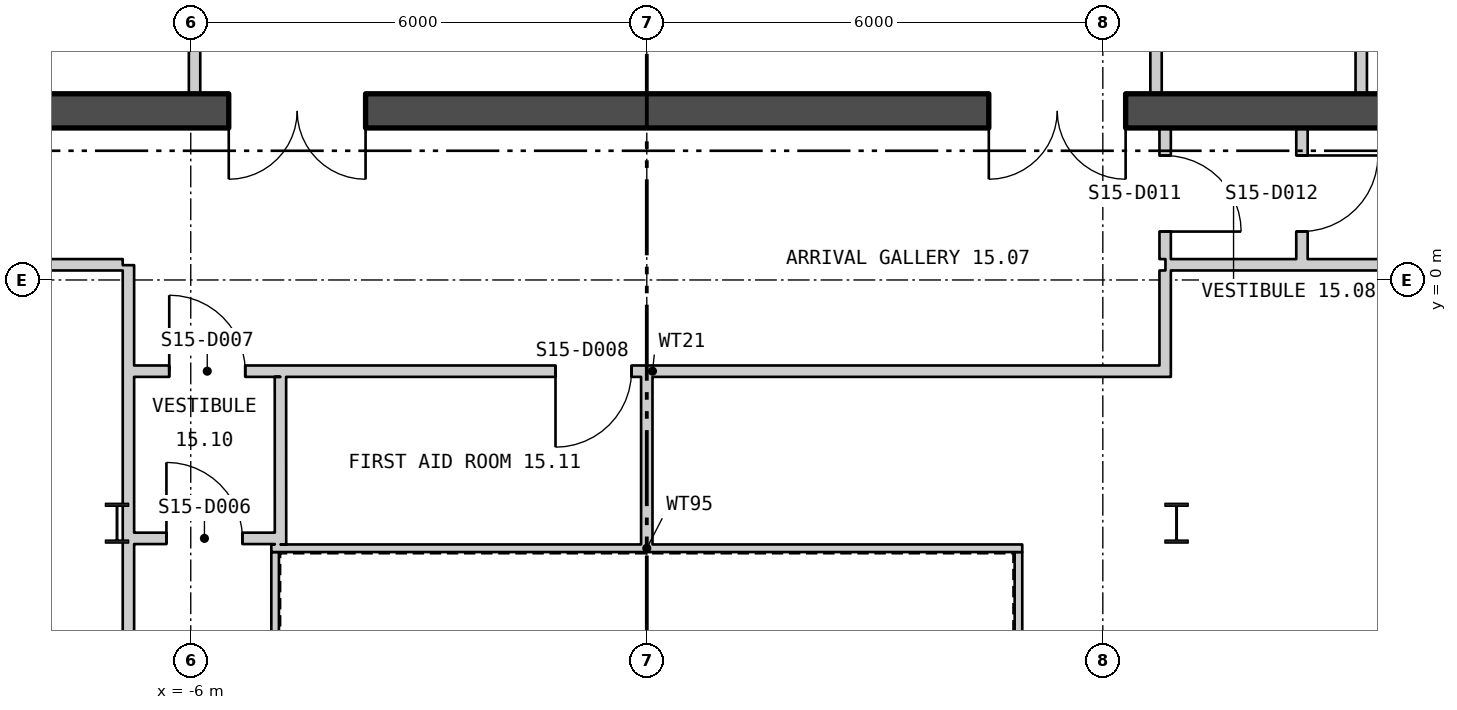
"""IFC4 building model, lengths in metres.
Left out: names, types, materials, properties, quantities, classifications, styles, units other than length and angle.
Written with IfcOpenShell. Run it as: python <this file> out.ifc"""

import sys

from ifc_helpers import new_model, si_unit, direction, frame, frame_2d, origin, origin_2d, place, context, subcontext, project, spatial, polyline, rectangle, i_section, outline, extrude, element, fill, save


model = new_model("IFC4")
c1 = context("Model", 3, precision=1e-05, world=origin(), true_north=direction((0.0, 1.0)))
c2 = subcontext(c1, "Body", "Model", "MODEL_VIEW")
j1 = project(units=[si_unit("LENGTHUNIT", "METRE"), si_unit("PLANEANGLEUNIT", "RADIAN")], contexts=[c1])
p1 = place(None, origin())
s1 = spatial("IfcSite", under=j1, at=p1, CompositionType="ELEMENT")
p2 = place(p1, origin())
s2 = spatial("IfcBuilding", under=s1, at=p2, CompositionType="ELEMENT")
p3 = place(p2, frame((0.0, 0.0, 204.3)))
s3 = spatial("IfcBuildingStorey", under=s2, at=p3, CompositionType="ELEMENT", Elevation=204.3)
for number, where, z_axis, x_axis in (
    (1, (6.97, -3.2, 0.0), (0.0, 0.0, 1.0), (1.0, 0.0, 0.0)),
    (2, (-6.97, -3.2, 0.0), (0.0, 0.0, 1.0), (1.0, 0.0, 0.0)),
):
    element("IfcColumn", number, at=place(p3, frame(where, z_axis=z_axis, x_axis=x_axis)), inside=s3, PredefinedType="COLUMN", context=c2, shape_type="SweptSolid", body=[
        extrude(i_section(OverallWidth=0.306, OverallDepth=0.524, WebThickness=0.021, FlangeThickness=0.04, at=origin_2d()), origin(), (0.0, 0.0, 1.0), 3.9),
    ])
p4 = place(p3, frame((-26.385, 13.887, -0.18), z_axis=(0.0, 0.0, 1.0), x_axis=(0.499999764979, -0.866025539474, 0.0)))
e3 = element("IfcWall", 3, at=p4, inside=s3, PredefinedType="SOLIDWALL", context=c2, shape_type="SweptSolid", body=[
    extrude(outline(polyline([(-0.13, -0.225), (45.87, -0.225), (45.61, 0.225), (0.13, 0.225), (-0.13, -0.225)])), origin(), (0.0, 0.0, 1.0), 3.68),
])
p5 = place(p4, frame((1.424, 0.0, 1.08)))
e4 = element("IfcOpeningElement", 4, at=p5, cuts=e3, PredefinedType="OPENING", context=c2, shape_type="SweptSolid", body=[
    extrude(rectangle(XDim=2.4, YDim=2.0, at=frame_2d((1.2, 1.0))), frame((0.0, 0.235, 0.0), z_axis=(0.0, -1.0, 0.0), x_axis=(1.0, 0.0, 0.0)), (0.0, 0.0, 1.0), 0.47),
])
p6 = place(p4, frame((5.893, 0.0, 1.08)))
e5 = element("IfcOpeningElement", 5, at=p6, cuts=e3, PredefinedType="OPENING", context=c2, shape_type="SweptSolid", body=[
    extrude(rectangle(XDim=2.4, YDim=2.0, at=frame_2d((1.2, 1.0))), frame((0.0, 0.235, 0.0), z_axis=(0.0, -1.0, 0.0), x_axis=(1.0, 0.0, 0.0)), (0.0, 0.0, 1.0), 0.47),
])
p7 = place(p4, frame((10.401, 0.0, 1.08)))
e6 = element("IfcOpeningElement", 6, at=p7, cuts=e3, PredefinedType="OPENING", context=c2, shape_type="SweptSolid", body=[
    extrude(rectangle(XDim=2.4, YDim=2.0, at=frame_2d((1.2, 1.0))), frame((0.0, 0.235, 0.0), z_axis=(0.0, -1.0, 0.0), x_axis=(1.0, 0.0, 0.0)), (0.0, 0.0, 1.0), 0.47),
])
p8 = place(p4, frame((14.909, 0.0, 1.08)))
e7 = element("IfcOpeningElement", 7, at=p8, cuts=e3, PredefinedType="OPENING", context=c2, shape_type="SweptSolid", body=[
    extrude(rectangle(XDim=2.4, YDim=2.0, at=frame_2d((1.2, 1.0))), frame((0.0, 0.235, 0.0), z_axis=(0.0, -1.0, 0.0), x_axis=(1.0, 0.0, 0.0)), (0.0, 0.0, 1.0), 0.47),
])
p9 = place(p4, frame((19.416, 0.0, 1.08)))
e8 = element("IfcOpeningElement", 8, at=p9, cuts=e3, PredefinedType="OPENING", context=c2, shape_type="SweptSolid", body=[
    extrude(rectangle(XDim=2.4, YDim=2.0, at=frame_2d((1.2, 1.0))), frame((0.0, 0.235, 0.0), z_axis=(0.0, -1.0, 0.0), x_axis=(1.0, 0.0, 0.0)), (0.0, 0.0, 1.0), 0.47),
])
p10 = place(p4, frame((23.924, 0.0, 1.08)))
e9 = element("IfcOpeningElement", 9, at=p10, cuts=e3, PredefinedType="OPENING", context=c2, shape_type="SweptSolid", body=[
    extrude(rectangle(XDim=2.4, YDim=2.0, at=frame_2d((1.2, 1.0))), frame((0.0, 0.235, 0.0), z_axis=(0.0, -1.0, 0.0), x_axis=(1.0, 0.0, 0.0)), (0.0, 0.0, 1.0), 0.47),
])
p11 = place(p4, frame((28.431, 0.0, 1.08)))
e10 = element("IfcOpeningElement", 10, at=p11, cuts=e3, PredefinedType="OPENING", context=c2, shape_type="SweptSolid", body=[
    extrude(rectangle(XDim=2.4, YDim=2.0, at=frame_2d((1.2, 1.0))), frame((0.0, 0.235, 0.0), z_axis=(0.0, -1.0, 0.0), x_axis=(1.0, 0.0, 0.0)), (0.0, 0.0, 1.0), 0.47),
])
p12 = place(p4, frame((32.939, 0.0, 1.08)))
e11 = element("IfcOpeningElement", 11, at=p12, cuts=e3, PredefinedType="OPENING", context=c2, shape_type="SweptSolid", body=[
    extrude(rectangle(XDim=2.4, YDim=2.0, at=frame_2d((1.2, 1.0))), frame((0.0, 0.235, 0.0), z_axis=(0.0, -1.0, 0.0), x_axis=(1.0, 0.0, 0.0)), (0.0, 0.0, 1.0), 0.47),
])
p13 = place(p4, frame((41.916, 0.0, 1.08)))
e12 = element("IfcOpeningElement", 12, at=p13, cuts=e3, PredefinedType="OPENING", context=c2, shape_type="SweptSolid", body=[
    extrude(rectangle(XDim=2.4, YDim=2.0, at=frame_2d((1.2, 1.0))), frame((0.0, 0.235, 0.0), z_axis=(0.0, -1.0, 0.0), x_axis=(1.0, 0.0, 0.0)), (0.0, 0.0, 1.0), 0.47),
])
p14 = place(p3, frame((3.515, -25.726, -0.18), z_axis=(0.0, 0.0, 1.0), x_axis=(0.499999764979, 0.866025539474, 0.0)))
e13 = element("IfcWall", 13, at=p14, inside=s3, PredefinedType="SOLIDWALL", context=c2, shape_type="SweptSolid", body=[
    extrude(outline(polyline([(-0.13, -0.225), (45.87, -0.225), (45.61, 0.225), (0.13, 0.225), (-0.13, -0.225)])), origin(), (0.0, 0.0, 1.0), 3.68),
])
p15 = place(p14, frame((1.424, 0.0, 1.08)))
e14 = element("IfcOpeningElement", 14, at=p15, cuts=e13, PredefinedType="OPENING", context=c2, shape_type="SweptSolid", body=[
    extrude(rectangle(XDim=2.4, YDim=2.0, at=frame_2d((1.2, 1.0))), frame((0.0, 0.235, 0.0), z_axis=(0.0, -1.0, 0.0), x_axis=(1.0, 0.0, 0.0)), (0.0, 0.0, 1.0), 0.47),
])
p16 = place(p14, frame((5.893, 0.0, 1.08)))
e15 = element("IfcOpeningElement", 15, at=p16, cuts=e13, PredefinedType="OPENING", context=c2, shape_type="SweptSolid", body=[
    extrude(rectangle(XDim=2.4, YDim=2.0, at=frame_2d((1.2, 1.0))), frame((0.0, 0.235, 0.0), z_axis=(0.0, -1.0, 0.0), x_axis=(1.0, 0.0, 0.0)), (0.0, 0.0, 1.0), 0.47),
])
p17 = place(p14, frame((10.401, 0.0, 1.08)))
e16 = element("IfcOpeningElement", 16, at=p17, cuts=e13, PredefinedType="OPENING", context=c2, shape_type="SweptSolid", body=[
    extrude(rectangle(XDim=2.4, YDim=2.0, at=frame_2d((1.2, 1.0))), frame((0.0, 0.235, 0.0), z_axis=(0.0, -1.0, 0.0), x_axis=(1.0, 0.0, 0.0)), (0.0, 0.0, 1.0), 0.47),
])
p18 = place(p14, frame((14.909, 0.0, 1.08)))
e17 = element("IfcOpeningElement", 17, at=p18, cuts=e13, PredefinedType="OPENING", context=c2, shape_type="SweptSolid", body=[
    extrude(rectangle(XDim=2.4, YDim=2.0, at=frame_2d((1.2, 1.0))), frame((0.0, 0.235, 0.0), z_axis=(0.0, -1.0, 0.0), x_axis=(1.0, 0.0, 0.0)), (0.0, 0.0, 1.0), 0.47),
])
p19 = place(p14, frame((19.416, 0.0, 1.08)))
e18 = element("IfcOpeningElement", 18, at=p19, cuts=e13, PredefinedType="OPENING", context=c2, shape_type="SweptSolid", body=[
    extrude(rectangle(XDim=2.4, YDim=2.0, at=frame_2d((1.2, 1.0))), frame((0.0, 0.235, 0.0), z_axis=(0.0, -1.0, 0.0), x_axis=(1.0, 0.0, 0.0)), (0.0, 0.0, 1.0), 0.47),
])
p20 = place(p14, frame((23.924, 0.0, 1.08)))
e19 = element("IfcOpeningElement", 19, at=p20, cuts=e13, PredefinedType="OPENING", context=c2, shape_type="SweptSolid", body=[
    extrude(rectangle(XDim=2.4, YDim=2.0, at=frame_2d((1.2, 1.0))), frame((0.0, 0.235, 0.0), z_axis=(0.0, -1.0, 0.0), x_axis=(1.0, 0.0, 0.0)), (0.0, 0.0, 1.0), 0.47),
])
p21 = place(p14, frame((28.431, 0.0, 1.08)))
e20 = element("IfcOpeningElement", 20, at=p21, cuts=e13, PredefinedType="OPENING", context=c2, shape_type="SweptSolid", body=[
    extrude(rectangle(XDim=2.4, YDim=2.0, at=frame_2d((1.2, 1.0))), frame((0.0, 0.235, 0.0), z_axis=(0.0, -1.0, 0.0), x_axis=(1.0, 0.0, 0.0)), (0.0, 0.0, 1.0), 0.47),
])
p22 = place(p14, frame((32.939, 0.0, 1.08)))
e21 = element("IfcOpeningElement", 21, at=p22, cuts=e13, PredefinedType="OPENING", context=c2, shape_type="SweptSolid", body=[
    extrude(rectangle(XDim=2.4, YDim=2.0, at=frame_2d((1.2, 1.0))), frame((0.0, 0.235, 0.0), z_axis=(0.0, -1.0, 0.0), x_axis=(1.0, 0.0, 0.0)), (0.0, 0.0, 1.0), 0.47),
])
p23 = place(p14, frame((37.447, 0.0, 1.08)))
e22 = element("IfcOpeningElement", 22, at=p23, cuts=e13, PredefinedType="OPENING", context=c2, shape_type="SweptSolid", body=[
    extrude(rectangle(XDim=2.4, YDim=2.0, at=frame_2d((1.2, 1.0))), frame((0.0, 0.235, 0.0), z_axis=(0.0, -1.0, 0.0), x_axis=(1.0, 0.0, 0.0)), (0.0, 0.0, 1.0), 0.47),
])
p24 = place(p14, frame((41.916, 0.0, 1.08)))
e23 = element("IfcOpeningElement", 23, at=p24, cuts=e13, PredefinedType="OPENING", context=c2, shape_type="SweptSolid", body=[
    extrude(rectangle(XDim=2.4, YDim=2.0, at=frame_2d((1.2, 1.0))), frame((0.0, 0.235, 0.0), z_axis=(0.0, -1.0, 0.0), x_axis=(1.0, 0.0, 0.0)), (0.0, 0.0, 1.0), 0.47),
])
p25 = place(p3, frame((4.89, -11.62, 0.0), z_axis=(0.0, 0.0, 1.0), x_axis=(0.0, 1.0, 0.0)))
e24 = element("IfcWall", 24, at=p25, inside=s3, PredefinedType="PARTITIONING", context=c2, shape_type="SweptSolid", body=[
    extrude(rectangle(XDim=8.04, YDim=0.1, at=frame_2d((4.02, 0.0))), origin(), (0.0, 0.0, 1.0), 3.7),
])
p26 = place(p3, frame((4.94, -3.53, 0.0), z_axis=(0.0, 0.0, 1.0), x_axis=(-1.0, 0.0, 0.0)))
e25 = element("IfcWall", 25, at=p26, inside=s3, PredefinedType="PARTITIONING", context=c2, shape_type="SweptSolid", body=[
    extrude(rectangle(XDim=9.88, YDim=0.1, at=frame_2d((4.94, 0.0))), origin(), (0.0, 0.0, 1.0), 3.7),
])
p27 = place(p3, frame((-4.89, -3.58, 0.0), z_axis=(0.0, 0.0, 1.0), x_axis=(0.0, -1.0, 0.0)))
e26 = element("IfcWall", 26, at=p27, inside=s3, PredefinedType="PARTITIONING", context=c2, shape_type="SweptSolid", body=[
    extrude(rectangle(XDim=8.04, YDim=0.1, at=frame_2d((4.02, 0.0))), origin(), (0.0, 0.0, 1.0), 3.7),
])
p28 = place(p3, frame((-16.2, 2.225, 0.0), z_axis=(0.0, 0.0, 1.0), x_axis=(1.0, 0.0, 0.0)))
e27 = element("IfcWall", 27, at=p28, inside=s3, PredefinedType="SHEAR", context=c2, shape_type="SweptSolid", body=[
    extrude(rectangle(XDim=32.4, YDim=0.45, at=frame_2d((16.2, 0.0))), origin(), (0.0, 0.0, 1.0), 3.7),
])
p29 = place(p28, frame((10.7, 0.0, 0.0)))
e28 = element("IfcOpeningElement", 28, at=p29, cuts=e27, PredefinedType="OPENING", context=c2, shape_type="SweptSolid", body=[
    extrude(rectangle(XDim=1.8, YDim=2.4, at=frame_2d((0.9, 1.2))), frame((0.0, 0.235, 0.0), z_axis=(0.0, -1.0, 0.0), x_axis=(1.0, 0.0, 0.0)), (0.0, 0.0, 1.0), 0.47),
])
p30 = place(p28, frame((20.7, 0.0, 0.0)))
e29 = element("IfcOpeningElement", 29, at=p30, cuts=e27, PredefinedType="OPENING", context=c2, shape_type="SweptSolid", body=[
    extrude(rectangle(XDim=1.8, YDim=2.4, at=frame_2d((0.9, 1.2))), frame((0.0, 0.235, 0.0), z_axis=(0.0, -1.0, 0.0), x_axis=(1.0, 0.0, 0.0)), (0.0, 0.0, 1.0), 0.47),
])
p31 = place(p3, frame((-5.95, 2.45, 0.0), z_axis=(0.0, 0.0, 1.0), x_axis=(0.0, 1.0, 0.0)))
e30 = element("IfcWall", 30, at=p31, inside=s3, PredefinedType="PARTITIONING", context=c2, shape_type="SweptSolid", body=[
    extrude(rectangle(XDim=2.975, YDim=0.15, at=frame_2d((1.488, 0.0))), origin(), (0.0, 0.0, 1.0), 3.7),
])
for number, where, z_axis, x_axis in (
    (31, (6.7, 2.45, 0.0), (0.0, 0.0, 1.0), (0.0, 1.0, 0.0)),
    (32, (9.4, 2.45, 0.0), (0.0, 0.0, 1.0), (0.0, 1.0, 0.0)),
):
    element("IfcWall", number, at=place(p3, frame(where, z_axis=z_axis, x_axis=x_axis)), inside=s3, PredefinedType="PARTITIONING", context=c2, shape_type="SweptSolid", body=[
        extrude(rectangle(XDim=3.575, YDim=0.15, at=frame_2d((1.788, 0.0))), origin(), (0.0, 0.0, 1.0), 3.7),
    ])
p32 = place(p3, frame((-17.925, 0.2, 0.0), z_axis=(0.0, 0.0, 1.0), x_axis=(1.0, 0.0, 0.0)))
e33 = element("IfcWall", 33, at=p32, inside=s3, PredefinedType="PARTITIONING", context=c2, shape_type="SweptSolid", body=[
    extrude(rectangle(XDim=11.03, YDim=0.15, at=frame_2d((5.515, 0.0))), origin(), (0.0, 0.0, 1.0), 3.7),
])
p33 = place(p3, frame((-6.82, -13.675, 0.0), z_axis=(0.0, 0.0, 1.0), x_axis=(0.0, 1.0, 0.0)))
e34 = element("IfcWall", 34, at=p33, inside=s3, PredefinedType="PARTITIONING", context=c2, shape_type="SweptSolid", body=[
    extrude(rectangle(XDim=10.263, YDim=0.15, at=frame_2d((5.131, 0.0))), origin(), (0.0, 0.0, 1.0), 3.11),
])
p34 = place(p3, frame((-6.82, -3.412, 0.0), z_axis=(0.0, 0.0, 1.0), x_axis=(0.0, 1.0, 0.0)))
e35 = element("IfcWall", 35, at=p34, inside=s3, PredefinedType="PARTITIONING", context=c2, shape_type="SweptSolid", body=[
    extrude(rectangle(XDim=3.607, YDim=0.15, at=frame_2d((1.804, 0.0))), origin(), (0.0, 0.0, 1.0), 3.7),
])
p35 = place(p3, frame((-6.745, -3.4, 0.0), z_axis=(0.0, 0.0, 1.0), x_axis=(1.0, 0.0, 0.0)))
e36 = element("IfcWall", 36, at=p35, inside=s3, PredefinedType="PARTITIONING", context=c2, shape_type="SweptSolid", body=[
    extrude(rectangle(XDim=1.851, YDim=0.15, at=frame_2d((0.925, 0.0))), origin(), (0.0, 0.0, 1.0), 3.7),
])
p36 = place(p35, frame((0.425, 0.0, 0.0)))
e37 = element("IfcOpeningElement", 37, at=p36, cuts=e36, PredefinedType="OPENING", context=c2, shape_type="SweptSolid", body=[
    extrude(rectangle(XDim=1.0, YDim=2.1, at=frame_2d((0.5, 1.05))), frame((0.0, 0.085, 0.0), z_axis=(0.0, -1.0, 0.0), x_axis=(1.0, 0.0, 0.0)), (0.0, 0.0, 1.0), 0.17),
])
p37 = place(p3, frame((-6.745, -1.2, 0.0), z_axis=(0.0, 0.0, 1.0), x_axis=(1.0, 0.0, 0.0)))
e38 = element("IfcWall", 38, at=p37, inside=s3, PredefinedType="PARTITIONING", context=c2, shape_type="SweptSolid", body=[
    extrude(rectangle(XDim=13.64, YDim=0.15, at=frame_2d((6.82, 0.0))), origin(), (0.0, 0.0, 1.0), 3.7),
])
p38 = place(p37, frame((0.462, 0.0, 0.0)))
e39 = element("IfcOpeningElement", 39, at=p38, cuts=e38, PredefinedType="OPENING", context=c2, shape_type="SweptSolid", body=[
    extrude(rectangle(XDim=1.0, YDim=2.1, at=frame_2d((0.5, 1.05))), frame((0.0, 0.085, 0.0), z_axis=(0.0, -1.0, 0.0), x_axis=(1.0, 0.0, 0.0)), (0.0, 0.0, 1.0), 0.17),
])
p39 = place(p37, frame((5.544, 0.0, 0.0)))
e40 = element("IfcOpeningElement", 40, at=p39, cuts=e38, PredefinedType="OPENING", context=c2, shape_type="SweptSolid", body=[
    extrude(rectangle(XDim=1.0, YDim=2.1, at=frame_2d((0.5, 1.05))), frame((0.0, 0.085, 0.0), z_axis=(0.0, -1.0, 0.0), x_axis=(1.0, 0.0, 0.0)), (0.0, 0.0, 1.0), 0.17),
])
p40 = place(p3, frame((-4.819, -3.48, 0.0), z_axis=(0.0, 0.0, 1.0), x_axis=(-0.000453514693, 0.999999897162, 0.0)))
e41 = element("IfcWall", 41, at=p40, inside=s3, PredefinedType="PARTITIONING", context=c2, shape_type="SweptSolid", body=[
    extrude(rectangle(XDim=2.205, YDim=0.15, at=frame_2d((1.103, 0.0))), origin(), (0.0, 0.0, 1.0), 3.7),
])
p41 = place(p3, frame((0.0, -3.48, 0.0), z_axis=(0.0, 0.0, 1.0), x_axis=(0.0, 1.0, 0.0)))
e42 = element("IfcWall", 42, at=p41, inside=s3, PredefinedType="PARTITIONING", context=c2, shape_type="SweptSolid", body=[
    extrude(rectangle(XDim=0.38, YDim=0.15, at=frame_2d((0.19, 0.0))), origin(), (0.0, 0.0, 1.0), 3.7),
])
p42 = place(p3, frame((0.0, -3.1, 0.0), z_axis=(0.0, 0.0, 1.0), x_axis=(0.0, 1.0, 0.0)))
e43 = element("IfcWall", 43, at=p42, inside=s3, PredefinedType="PARTITIONING", context=c2, shape_type="SweptSolid", body=[
    extrude(rectangle(XDim=1.825, YDim=0.15, at=frame_2d((0.912, 0.0))), origin(), (0.0, 0.0, 1.0), 3.15),
])
p43 = place(p3, frame((6.82, -1.125, 0.0), z_axis=(0.0, 0.0, 1.0), x_axis=(0.0, 1.0, 0.0)))
e44 = element("IfcWall", 44, at=p43, inside=s3, PredefinedType="PARTITIONING", context=c2, shape_type="SweptSolid", body=[
    extrude(rectangle(XDim=1.25, YDim=0.15, at=frame_2d((0.625, 0.0))), origin(), (0.0, 0.0, 1.0), 3.7),
])
p44 = place(p3, frame((6.82, 0.275, 0.0), z_axis=(0.0, 0.0, 1.0), x_axis=(0.0, 1.0, 0.0)))
e45 = element("IfcWall", 45, at=p44, inside=s3, PredefinedType="PARTITIONING", context=c2, shape_type="SweptSolid", body=[
    extrude(rectangle(XDim=1.725, YDim=0.15, at=frame_2d((0.863, 0.0))), origin(), (0.0, 0.0, 1.0), 3.7),
])
p45 = place(p44, frame((0.362, 0.0, 0.0)))
e46 = element("IfcOpeningElement", 46, at=p45, cuts=e45, PredefinedType="OPENING", context=c2, shape_type="SweptSolid", body=[
    extrude(rectangle(XDim=1.0, YDim=2.1, at=frame_2d((0.5, 1.05))), frame((0.0, 0.085, 0.0), z_axis=(0.0, -1.0, 0.0), x_axis=(1.0, 0.0, 0.0)), (0.0, 0.0, 1.0), 0.17),
])
p46 = place(p3, frame((6.824, 0.2, 0.0), z_axis=(0.0, 0.0, 1.0), x_axis=(1.0, 0.0, 0.0)))
e47 = element("IfcWall", 47, at=p46, inside=s3, PredefinedType="PARTITIONING", context=c2, shape_type="SweptSolid", body=[
    extrude(rectangle(XDim=11.101, YDim=0.15, at=frame_2d((5.551, 0.0))), origin(), (0.0, 0.0, 1.0), 3.7),
])
p47 = place(p3, frame((8.62, 0.275, 0.0), z_axis=(0.0, 0.0, 1.0), x_axis=(0.0, 1.0, 0.0)))
e48 = element("IfcWall", 48, at=p47, inside=s3, PredefinedType="PARTITIONING", context=c2, shape_type="SweptSolid", body=[
    extrude(rectangle(XDim=1.725, YDim=0.15, at=frame_2d((0.863, 0.0))), origin(), (0.0, 0.0, 1.0), 3.7),
])
p48 = place(p47, frame((0.363, 0.0, 0.0)))
e49 = element("IfcOpeningElement", 49, at=p48, cuts=e48, PredefinedType="OPENING", context=c2, shape_type="SweptSolid", body=[
    extrude(rectangle(XDim=1.0, YDim=2.1, at=frame_2d((0.5, 1.05))), frame((0.0, 0.085, 0.0), z_axis=(0.0, -1.0, 0.0), x_axis=(1.0, 0.0, 0.0)), (0.0, 0.0, 1.0), 0.17),
])
p49 = place(p29, origin())
e50 = element("IfcDoor", 50, at=p49, inside=s3, OperationType="DOUBLE_DOOR_SINGLE_SWING", PredefinedType="DOOR", context=c2, shape_type="SweptSolid", body=[
    extrude(rectangle(XDim=1.8, YDim=2.4, at=frame_2d((0.9, 1.2))), frame((0.0, 0.025, 0.0), z_axis=(0.0, -1.0, 0.0), x_axis=(1.0, 0.0, 0.0)), (0.0, 0.0, 1.0), 0.05),
])
fill(e28, e50)
p50 = place(p30, origin())
e51 = element("IfcDoor", 51, at=p50, inside=s3, OperationType="DOUBLE_DOOR_SINGLE_SWING", PredefinedType="DOOR", context=c2, shape_type="SweptSolid", body=[
    extrude(rectangle(XDim=1.8, YDim=2.4, at=frame_2d((0.9, 1.2))), frame((0.0, 0.025, 0.0), z_axis=(0.0, -1.0, 0.0), x_axis=(1.0, 0.0, 0.0)), (0.0, 0.0, 1.0), 0.05),
])
fill(e29, e51)
p51 = place(p36, origin())
e52 = element("IfcDoor", 52, at=p51, inside=s3, OperationType="SINGLE_SWING_RIGHT", PredefinedType="DOOR", context=c2, shape_type="SweptSolid", body=[
    extrude(rectangle(XDim=1.0, YDim=2.1, at=frame_2d((0.5, 1.05))), frame((0.0, 0.025, 0.0), z_axis=(0.0, -1.0, 0.0), x_axis=(1.0, 0.0, 0.0)), (0.0, 0.0, 1.0), 0.05),
])
fill(e37, e52)
p52 = place(p38, origin())
e53 = element("IfcDoor", 53, at=p52, inside=s3, OperationType="SINGLE_SWING_RIGHT", PredefinedType="DOOR", context=c2, shape_type="SweptSolid", body=[
    extrude(rectangle(XDim=1.0, YDim=2.1, at=frame_2d((0.5, 1.05))), frame((0.0, 0.025, 0.0), z_axis=(0.0, -1.0, 0.0), x_axis=(1.0, 0.0, 0.0)), (0.0, 0.0, 1.0), 0.05),
])
fill(e39, e53)
p53 = place(p39, origin())
e54 = element("IfcDoor", 54, at=p53, inside=s3, OperationType="SINGLE_SWING_LEFT", PredefinedType="DOOR", context=c2, shape_type="SweptSolid", body=[
    extrude(rectangle(XDim=1.0, YDim=2.1, at=frame_2d((0.5, 1.05))), frame((0.0, 0.025, 0.0), z_axis=(0.0, -1.0, 0.0), x_axis=(1.0, 0.0, 0.0)), (0.0, 0.0, 1.0), 0.05),
])
fill(e40, e54)
p54 = place(p45, origin())
e55 = element("IfcDoor", 55, at=p54, inside=s3, OperationType="SINGLE_SWING_LEFT", PredefinedType="DOOR", context=c2, shape_type="SweptSolid", body=[
    extrude(rectangle(XDim=1.0, YDim=2.1, at=frame_2d((0.5, 1.05))), frame((0.0, 0.025, 0.0), z_axis=(0.0, -1.0, 0.0), x_axis=(1.0, 0.0, 0.0)), (0.0, 0.0, 1.0), 0.05),
])
fill(e46, e55)
p55 = place(p48, origin())
e56 = element("IfcDoor", 56, at=p55, inside=s3, OperationType="SINGLE_SWING_RIGHT", PredefinedType="DOOR", context=c2, shape_type="SweptSolid", body=[
    extrude(rectangle(XDim=1.0, YDim=2.1, at=frame_2d((0.5, 1.05))), frame((0.0, 0.025, 0.0), z_axis=(0.0, -1.0, 0.0), x_axis=(1.0, 0.0, 0.0)), (0.0, 0.0, 1.0), 0.05),
])
fill(e49, e56)
save(model, sys.argv[1])
